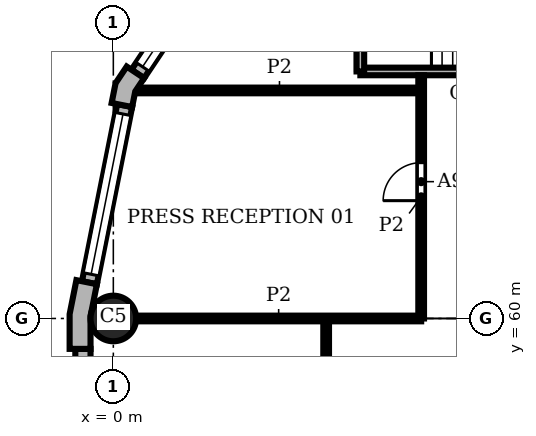
"""IFC4 building model, lengths in metres.
Left out: names, types, materials, properties, quantities, classifications, styles, units other than length and angle.
Written with IfcOpenShell. Run it as: python <this file> out.ifc"""

import sys

from ifc_helpers import new_model, si_unit, direction, frame, frame_2d, origin, origin_2d, place, context, subcontext, project, spatial, polyline, rectangle, circle, outline, extrude, element, fill, save


model = new_model("IFC4")
c1 = context("Model", 3, precision=1e-05, world=origin(), true_north=direction((0.0, 1.0)))
c2 = subcontext(c1, "Body", "Model", "MODEL_VIEW")
j1 = project(units=[si_unit("LENGTHUNIT", "METRE"), si_unit("PLANEANGLEUNIT", "RADIAN")], contexts=[c1])
p1 = place(None, origin())
s1 = spatial("IfcSite", under=j1, at=p1, CompositionType="ELEMENT")
p2 = place(p1, origin())
s2 = spatial("IfcBuilding", under=s1, at=p2, CompositionType="ELEMENT")
p3 = place(p2, frame((0.0, 0.0, 105.6)))
s3 = spatial("IfcBuildingStorey", under=s2, at=p3, CompositionType="ELEMENT", Elevation=105.6)
p4 = place(p3, frame((0.0, 60.0, 0.0), z_axis=(0.0, 0.0, 1.0), x_axis=(1.0, 0.0, 0.0)))
e1 = element("IfcColumn", 1, at=p4, inside=s3, PredefinedType="COLUMN", context=c2, shape_type="SweptSolid", body=[
    extrude(circle(Radius=0.6, at=origin_2d()), origin(), (0.0, 0.0, 1.0), 3.9),
])
p5 = place(p3, origin())
e2 = element("IfcWall", 2, at=p5, inside=s3, PredefinedType="SOLIDWALL", context=c2, shape_type="SweptSolid", body=[
    extrude(outline(polyline([(0.477, 66.545), (0.352, 66.629), (0.059, 66.189), (-0.045, 65.67), (0.103, 65.641), (0.495, 65.563), (0.577, 65.974), (0.81, 66.323), (0.477, 66.545)])), origin(), (0.0, 0.0, 1.0), 3.9),
])
e3 = element("IfcWall", 3, at=p5, inside=s3, PredefinedType="SOLIDWALL", context=c2, shape_type="SweptSolid", body=[
    extrude(outline(polyline([(-0.825, 60.98), (-0.972, 61.009), (-1.15, 60.113), (-1.15, 59.2), (-1.0, 59.2), (-0.6, 59.2), (-0.6, 60.059), (-0.432, 60.902), (-0.825, 60.98)])), origin(), (0.0, 0.0, 1.0), 3.9),
])
p6 = place(p3, frame((3.284, 70.386, 0.0), z_axis=(0.0, 0.0, 1.0), x_axis=(-0.555541552266, -0.831488775454, 0.0)))
e4 = element("IfcWall", 4, at=p6, inside=s3, PredefinedType="SOLIDWALL", context=c2, shape_type="SweptSolid", body=[
    extrude(rectangle(XDim=4.753, YDim=0.4, at=frame_2d((2.376, 0.0))), origin(), (0.0, 0.0, 1.0), 3.9),
])
p7 = place(p6, frame((0.226, 0.0, 0.9)))
e5 = element("IfcOpeningElement", 5, at=p7, cuts=e4, PredefinedType="OPENING", context=c2, shape_type="SweptSolid", body=[
    extrude(rectangle(XDim=4.3, YDim=2.35, at=frame_2d((2.15, 1.175))), frame((0.0, 0.21, 0.0), z_axis=(0.0, -1.0, 0.0), x_axis=(1.0, 0.0, 0.0)), (0.0, 0.0, 1.0), 0.42),
])
p8 = place(p3, frame((0.299, 65.602, 0.0), z_axis=(0.0, 0.0, 1.0), x_axis=(-0.195098533057, -0.98078364709, 0.0)))
e6 = element("IfcWall", 6, at=p8, inside=s3, PredefinedType="SOLIDWALL", context=c2, shape_type="SweptSolid", body=[
    extrude(rectangle(XDim=4.753, YDim=0.4, at=frame_2d((2.376, 0.0))), origin(), (0.0, 0.0, 1.0), 3.9),
])
p9 = place(p8, frame((0.226, 0.0, 0.9)))
e7 = element("IfcOpeningElement", 7, at=p9, cuts=e6, PredefinedType="OPENING", context=c2, shape_type="SweptSolid", body=[
    extrude(rectangle(XDim=4.3, YDim=2.35, at=frame_2d((2.15, 1.175))), frame((0.0, 0.21, 0.0), z_axis=(0.0, -1.0, 0.0), x_axis=(1.0, 0.0, 0.0)), (0.0, 0.0, 1.0), 0.42),
])
p10 = place(p3, frame((-0.8, 59.2, 0.0), z_axis=(0.0, 0.0, 1.0), x_axis=(0.0, -1.0, 0.0)))
e8 = element("IfcWall", 8, at=p10, inside=s3, PredefinedType="SOLIDWALL", context=c2, shape_type="SweptSolid", body=[
    extrude(rectangle(XDim=18.4, YDim=0.4, at=frame_2d((9.2, 0.0))), origin(), (0.0, 0.0, 1.0), 3.9),
])
p11 = place(p10, frame((3.75, 0.0, 0.9)))
e9 = element("IfcOpeningElement", 9, at=p11, cuts=e8, PredefinedType="OPENING", context=c2, shape_type="SweptSolid", body=[
    extrude(rectangle(XDim=0.9, YDim=2.35, at=frame_2d((0.45, 1.175))), frame((0.0, 0.21, 0.0), z_axis=(0.0, -1.0, 0.0), x_axis=(1.0, 0.0, 0.0)), (0.0, 0.0, 1.0), 0.42),
])
p12 = place(p10, frame((13.75, 0.0, 0.9)))
e10 = element("IfcOpeningElement", 10, at=p12, cuts=e8, PredefinedType="OPENING", context=c2, shape_type="SweptSolid", body=[
    extrude(rectangle(XDim=0.9, YDim=2.35, at=frame_2d((0.45, 1.175))), frame((0.0, 0.21, 0.0), z_axis=(0.0, -1.0, 0.0), x_axis=(1.0, 0.0, 0.0)), (0.0, 0.0, 1.0), 0.42),
])
p13 = place(p3, frame((6.5, 66.5, 0.0), z_axis=(0.0, 0.0, 1.0), x_axis=(1.0, 0.0, 0.0)))
e11 = element("IfcWall", 11, at=p13, inside=s3, PredefinedType="SHEAR", context=c2, shape_type="SweptSolid", body=[
    extrude(rectangle(XDim=6.6, YDim=0.2, at=frame_2d((3.3, 0.0))), origin(), (0.0, 0.0, 1.0), 3.58),
])
p14 = place(p13, frame((5.225, 0.0, 0.0)))
e12 = element("IfcOpeningElement", 12, at=p14, cuts=e11, PredefinedType="OPENING", context=c2, shape_type="SweptSolid", body=[
    extrude(rectangle(XDim=1.0, YDim=2.1, at=frame_2d((0.5, 1.05))), frame((0.0, 0.11, 0.0), z_axis=(0.0, -1.0, 0.0), x_axis=(1.0, 0.0, 0.0)), (0.0, 0.0, 1.0), 0.22),
])
p15 = place(p3, frame((6.5, 66.5, 0.0), z_axis=(0.0, 0.0, 1.0), x_axis=(0.0, 1.0, 0.0)))
e13 = element("IfcWall", 13, at=p15, inside=s3, PredefinedType="SHEAR", context=c2, shape_type="SweptSolid", body=[
    extrude(rectangle(XDim=3.3, YDim=0.2, at=frame_2d((1.65, 0.0))), origin(), (0.0, 0.0, 1.0), 3.58),
])
p16 = place(p3, frame((5.6, 5.6, 0.0), z_axis=(0.0, 0.0, 1.0), x_axis=(0.0, 1.0, 0.0)))
e14 = element("IfcWall", 14, at=p16, inside=s3, PredefinedType="PARTITIONING", context=c2, shape_type="SweptSolid", body=[
    extrude(rectangle(XDim=54.4, YDim=0.15, at=frame_2d((27.2, 0.0))), origin(), (0.0, 0.0, 1.0), 3.58),
])
p17 = place(p16, frame((35.8, 0.0, 0.0)))
e15 = element("IfcOpeningElement", 15, at=p17, cuts=e14, PredefinedType="OPENING", context=c2, shape_type="SweptSolid", body=[
    extrude(rectangle(XDim=1.8, YDim=2.1, at=frame_2d((0.9, 1.05))), frame((0.0, 0.085, 0.0), z_axis=(0.0, -1.0, 0.0), x_axis=(1.0, 0.0, 0.0)), (0.0, 0.0, 1.0), 0.17),
])
p18 = place(p3, frame((8.1, 60.0, 0.0), z_axis=(0.0, 0.0, 1.0), x_axis=(0.0, 1.0, 0.0)))
e16 = element("IfcWall", 16, at=p18, inside=s3, PredefinedType="PARTITIONING", context=c2, shape_type="SweptSolid", body=[
    extrude(rectangle(XDim=6.4, YDim=0.15, at=frame_2d((3.2, 0.0))), origin(), (0.0, 0.0, 1.0), 3.58),
])
p19 = place(p18, frame((3.1, 0.0, 0.0)))
e17 = element("IfcOpeningElement", 17, at=p19, cuts=e16, PredefinedType="OPENING", context=c2, shape_type="SweptSolid", body=[
    extrude(rectangle(XDim=1.0, YDim=2.1, at=frame_2d((0.5, 1.05))), frame((0.0, 0.085, 0.0), z_axis=(0.0, -1.0, 0.0), x_axis=(1.0, 0.0, 0.0)), (0.0, 0.0, 1.0), 0.17),
])
p20 = place(p3, frame((0.6, 60.0, 0.0), z_axis=(0.0, 0.0, 1.0), x_axis=(1.0, 0.0, 0.0)))
e18 = element("IfcWall", 18, at=p20, inside=s3, PredefinedType="PARTITIONING", context=c2, shape_type="SweptSolid", body=[
    extrude(rectangle(XDim=7.5, YDim=0.15, at=frame_2d((3.75, 0.0))), origin(), (0.0, 0.0, 1.0), 3.58),
])
p21 = place(p3, frame((0.644, 66.0, 0.0), z_axis=(0.0, 0.0, 1.0), x_axis=(1.0, 0.0, 0.0)))
e19 = element("IfcWall", 19, at=p21, inside=s3, PredefinedType="PARTITIONING", context=c2, shape_type="SweptSolid", body=[
    extrude(rectangle(XDim=7.456, YDim=0.15, at=frame_2d((3.728, 0.0))), origin(), (0.0, 0.0, 1.0), 3.58),
])
p22 = place(p7, origin())
e20 = element("IfcWindow", 20, at=p22, inside=s3, PartitioningType="SINGLE_PANEL", PredefinedType="WINDOW", context=c2, shape_type="SweptSolid", body=[
    extrude(rectangle(XDim=4.3, YDim=2.35, at=frame_2d((2.15, 1.175))), frame((0.0, 0.16, 0.0), z_axis=(0.0, -1.0, 0.0), x_axis=(1.0, 0.0, 0.0)), (0.0, 0.0, 1.0), 0.06),
])
fill(e5, e20)
p23 = place(p9, origin())
e21 = element("IfcWindow", 21, at=p23, inside=s3, PartitioningType="SINGLE_PANEL", PredefinedType="WINDOW", context=c2, shape_type="SweptSolid", body=[
    extrude(rectangle(XDim=4.3, YDim=2.35, at=frame_2d((2.15, 1.175))), frame((0.0, 0.16, 0.0), z_axis=(0.0, -1.0, 0.0), x_axis=(1.0, 0.0, 0.0)), (0.0, 0.0, 1.0), 0.06),
])
fill(e7, e21)
p24 = place(p19, origin())
e22 = element("IfcDoor", 22, at=p24, inside=s3, OperationType="SINGLE_SWING_LEFT", PredefinedType="DOOR", context=c2, shape_type="SweptSolid", body=[
    extrude(rectangle(XDim=1.0, YDim=2.1, at=frame_2d((0.5, 1.05))), frame((0.0, 0.025, 0.0), z_axis=(0.0, -1.0, 0.0), x_axis=(1.0, 0.0, 0.0)), (0.0, 0.0, 1.0), 0.05),
])
fill(e17, e22)
save(model, sys.argv[1])
